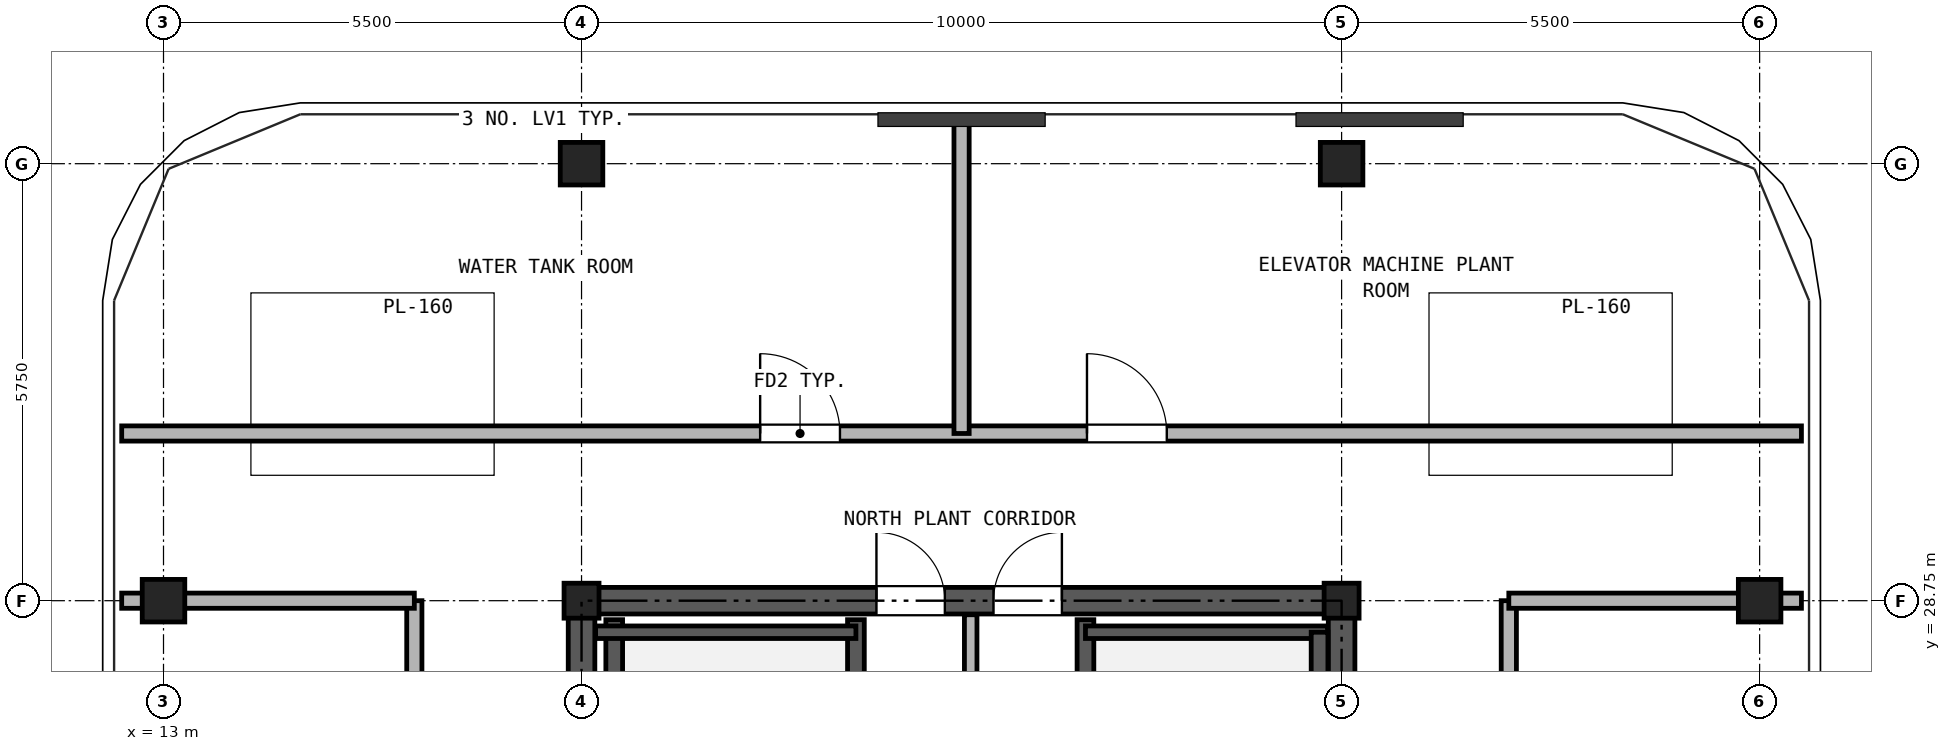
"""IFC4 building model, lengths in metres.
Left out: names, types, materials, properties, quantities, classifications, styles, units other than length and angle.
Written with IfcOpenShell. Run it as: python <this file> out.ifc"""

import sys

from ifc_helpers import new_model, si_unit, direction, frame, frame_2d, origin, origin_2d, place, context, subcontext, project, spatial, rectangle, hollow_rectangle, extrude, source, transform, mapped, element, fill, save


model = new_model("IFC4")
c1 = context("Model", 3, precision=1e-05, world=origin(), true_north=direction((0.0, 1.0)))
c2 = subcontext(c1, "Body", "Model", "MODEL_VIEW")
j1 = project(units=[si_unit("LENGTHUNIT", "METRE"), si_unit("PLANEANGLEUNIT", "RADIAN")], contexts=[c1])
p1 = place(None, origin())
s1 = spatial("IfcSite", under=j1, at=p1, CompositionType="ELEMENT")
p2 = place(p1, origin())
s2 = spatial("IfcBuilding", under=s1, at=p2, CompositionType="ELEMENT")
p3 = place(p2, frame((0.0, 0.0, 289.3)))
s3 = spatial("IfcBuildingStorey", under=s2, at=p3, CompositionType="ELEMENT", Elevation=289.3)
m1 = source(origin(), c2, "Body", "SweptSolid", [
    extrude(hollow_rectangle(XDim=0.56, YDim=0.56, WallThickness=0.03, at=origin_2d()), origin(), (0.0, 0.0, 1.0), 3.38),
])
for number, where, z_axis, x_axis in (
    (1, (18.5, 34.5, 0.0), (0.0, 0.0, 1.0), (1.0, 0.0, 0.0)),
    (2, (28.5, 34.5, 0.0), (0.0, 0.0, 1.0), (1.0, 0.0, 0.0)),
    (3, (13.0, 28.75, 0.0), (0.0, 0.0, 1.0), (1.0, 0.0, 0.0)),
    (4, (34.0, 28.75, 0.0), (0.0, 0.0, 1.0), (1.0, 0.0, 0.0)),
):
    element("IfcColumn", number, at=place(p3, frame(where, z_axis=z_axis, x_axis=x_axis)), inside=s3, PredefinedType="COLUMN", context=c2, shape_type="MappedRepresentation", body=[
        mapped(m1, transform((0.0, 0.0, 0.0), x_axis=(1.0, 0.0, 0.0), y_axis=(0.0, 1.0, 0.0), z_axis=(0.0, 0.0, 1.0), scale=1.0)),
    ])
m2 = source(origin(), c2, "Body", "SweptSolid", [
    extrude(hollow_rectangle(XDim=0.46, YDim=0.46, WallThickness=0.025, at=origin_2d()), origin(), (0.0, 0.0, 1.0), 3.38),
])
for number, where, z_axis, x_axis in (
    (5, (18.5, 28.75, 0.0), (0.0, 0.0, 1.0), (1.0, 0.0, 0.0)),
    (6, (28.5, 28.75, 0.0), (0.0, 0.0, 1.0), (1.0, 0.0, 0.0)),
):
    element("IfcColumn", number, at=place(p3, frame(where, z_axis=z_axis, x_axis=x_axis)), inside=s3, PredefinedType="COLUMN", context=c2, shape_type="MappedRepresentation", body=[
        mapped(m2, transform((0.0, 0.0, 0.0), x_axis=(1.0, 0.0, 0.0), y_axis=(0.0, 1.0, 0.0), z_axis=(0.0, 0.0, 1.0), scale=1.0)),
    ])
p4 = place(p3, frame((18.325, 28.75, 0.0), z_axis=(0.0, 0.0, 1.0), x_axis=(1.0, 0.0, 0.0)))
e7 = element("IfcWall", 7, at=p4, inside=s3, PredefinedType="SHEAR", context=c2, shape_type="SweptSolid", body=[
    extrude(rectangle(XDim=10.35, YDim=0.35, at=frame_2d((5.175, 0.0))), origin(), (0.0, 0.0, 1.0), 3.38),
])
p5 = place(p4, frame((4.055, 0.0, 0.0)))
e8 = element("IfcOpeningElement", 8, at=p5, cuts=e7, PredefinedType="OPENING", context=c2, shape_type="SweptSolid", body=[
    extrude(rectangle(XDim=0.9, YDim=2.05, at=frame_2d((0.45, 1.025))), frame((0.0, 0.185, 0.0), z_axis=(0.0, -1.0, 0.0), x_axis=(1.0, 0.0, 0.0)), (0.0, 0.0, 1.0), 0.37),
])
p6 = place(p4, frame((5.595, 0.0, 0.0)))
e9 = element("IfcOpeningElement", 9, at=p6, cuts=e7, PredefinedType="OPENING", context=c2, shape_type="SweptSolid", body=[
    extrude(rectangle(XDim=0.9, YDim=2.05, at=frame_2d((0.45, 1.025))), frame((0.0, 0.185, 0.0), z_axis=(0.0, -1.0, 0.0), x_axis=(1.0, 0.0, 0.0)), (0.0, 0.0, 1.0), 0.37),
])
p7 = place(p3, frame((18.5, 11.675, 0.0), z_axis=(0.0, 0.0, 1.0), x_axis=(0.0, 1.0, 0.0)))
e10 = element("IfcWall", 10, at=p7, inside=s3, PredefinedType="SHEAR", context=c2, shape_type="SweptSolid", body=[
    extrude(rectangle(XDim=16.9, YDim=0.35, at=frame_2d((8.45, 0.0))), origin(), (0.0, 0.0, 1.0), 3.38),
])
p8 = place(p7, frame((7.475, 0.0, 0.0)))
e11 = element("IfcOpeningElement", 11, at=p8, cuts=e10, PredefinedType="OPENING", context=c2, shape_type="SweptSolid", body=[
    extrude(rectangle(XDim=1.15, YDim=2.2, at=frame_2d((0.575, 1.1))), frame((0.0, 0.185, 0.0), z_axis=(0.0, -1.0, 0.0), x_axis=(1.0, 0.0, 0.0)), (0.0, 0.0, 1.0), 0.37),
])
p9 = place(p3, frame((28.5, 11.675, 0.0), z_axis=(0.0, 0.0, 1.0), x_axis=(0.0, 1.0, 0.0)))
e12 = element("IfcWall", 12, at=p9, inside=s3, PredefinedType="SHEAR", context=c2, shape_type="SweptSolid", body=[
    extrude(rectangle(XDim=16.9, YDim=0.35, at=frame_2d((8.45, 0.0))), origin(), (0.0, 0.0, 1.0), 3.38),
])
p10 = place(p9, frame((7.475, 0.0, 0.0)))
e13 = element("IfcOpeningElement", 13, at=p10, cuts=e12, PredefinedType="OPENING", context=c2, shape_type="SweptSolid", body=[
    extrude(rectangle(XDim=1.15, YDim=2.2, at=frame_2d((0.575, 1.1))), frame((0.0, 0.185, 0.0), z_axis=(0.0, -1.0, 0.0), x_axis=(1.0, 0.0, 0.0)), (0.0, 0.0, 1.0), 0.37),
])
for number, where, z_axis, x_axis in (
    (14, (18.93, 21.39, 0.0), (0.0, 0.0, 1.0), (0.0, 1.0, 0.0)),
    (15, (22.11, 21.39, 0.0), (0.0, 0.0, 1.0), (0.0, 1.0, 0.0)),
    (16, (25.13, 21.39, 0.0), (0.0, 0.0, 1.0), (0.0, 1.0, 0.0)),
):
    element("IfcWall", number, at=place(p3, frame(where, z_axis=z_axis, x_axis=x_axis)), inside=s3, PredefinedType="SOLIDWALL", context=c2, shape_type="SweptSolid", body=[
        extrude(rectangle(XDim=7.11, YDim=0.22, at=frame_2d((3.555, 0.0))), origin(), (0.0, 0.0, 1.0), 3.38),
    ])
p11 = place(p3, frame((18.685, 28.335, 0.0), z_axis=(0.0, 0.0, 1.0), x_axis=(1.0, 0.0, 0.0)))
e17 = element("IfcWall", 17, at=p11, inside=s3, PredefinedType="PARTITIONING", context=c2, shape_type="SweptSolid", body=[
    extrude(rectangle(XDim=3.425, YDim=0.165, at=frame_2d((1.712, 0.0))), origin(), (0.0, 0.0, 1.0), 3.38),
])
p12 = place(p3, frame((25.13, 28.335, 0.0), z_axis=(0.0, 0.0, 1.0), x_axis=(1.0, 0.0, 0.0)))
e18 = element("IfcWall", 18, at=p12, inside=s3, PredefinedType="PARTITIONING", context=c2, shape_type="SweptSolid", body=[
    extrude(rectangle(XDim=3.185, YDim=0.165, at=frame_2d((1.593, 0.0))), origin(), (0.0, 0.0, 1.0), 3.38),
])
p13 = place(p3, frame((28.21, 21.39, 0.0), z_axis=(0.0, 0.0, 1.0), x_axis=(0.0, 1.0, 0.0)))
e19 = element("IfcWall", 19, at=p13, inside=s3, PredefinedType="SOLIDWALL", context=c2, shape_type="SweptSolid", body=[
    extrude(rectangle(XDim=6.945, YDim=0.22, at=frame_2d((3.473, 0.0))), origin(), (0.0, 0.0, 1.0), 3.38),
])
p14 = place(p3, frame((23.62, 24.4, 0.0), z_axis=(0.0, 0.0, 1.0), x_axis=(0.0, 1.0, 0.0)))
e20 = element("IfcWall", 20, at=p14, inside=s3, PredefinedType="PARTITIONING", context=c2, shape_type="SweptSolid", body=[
    extrude(rectangle(XDim=4.165, YDim=0.165, at=frame_2d((2.083, 0.0))), origin(), (0.0, 0.0, 1.0), 3.38),
])
p15 = place(p3, frame((12.45, 30.95, 0.0), z_axis=(0.0, 0.0, 1.0), x_axis=(1.0, 0.0, 0.0)))
e21 = element("IfcWall", 21, at=p15, inside=s3, PredefinedType="PARTITIONING", context=c2, shape_type="SweptSolid", body=[
    extrude(rectangle(XDim=22.1, YDim=0.2, at=frame_2d((11.05, 0.0))), origin(), (0.0, 0.0, 1.0), 3.38),
])
p16 = place(p15, frame((8.4, 0.0, 0.0)))
e22 = element("IfcOpeningElement", 22, at=p16, cuts=e21, PredefinedType="OPENING", context=c2, shape_type="SweptSolid", body=[
    extrude(rectangle(XDim=1.05, YDim=2.15, at=frame_2d((0.525, 1.075))), frame((0.0, 0.11, 0.0), z_axis=(0.0, -1.0, 0.0), x_axis=(1.0, 0.0, 0.0)), (0.0, 0.0, 1.0), 0.22),
])
p17 = place(p15, frame((12.7, 0.0, 0.0)))
e23 = element("IfcOpeningElement", 23, at=p17, cuts=e21, PredefinedType="OPENING", context=c2, shape_type="SweptSolid", body=[
    extrude(rectangle(XDim=1.05, YDim=2.15, at=frame_2d((0.525, 1.075))), frame((0.0, 0.11, 0.0), z_axis=(0.0, -1.0, 0.0), x_axis=(1.0, 0.0, 0.0)), (0.0, 0.0, 1.0), 0.22),
])
p18 = place(p3, frame((16.3, 8.9, 0.0), z_axis=(0.0, 0.0, 1.0), x_axis=(0.0, 1.0, 0.0)))
e24 = element("IfcWall", 24, at=p18, inside=s3, PredefinedType="PARTITIONING", context=c2, shape_type="SweptSolid", body=[
    extrude(rectangle(XDim=19.85, YDim=0.2, at=frame_2d((9.925, 0.0))), origin(), (0.0, 0.0, 1.0), 3.38),
])
p19 = place(p18, frame((4.55, 0.0, 0.0)))
e25 = element("IfcOpeningElement", 25, at=p19, cuts=e24, PredefinedType="OPENING", context=c2, shape_type="SweptSolid", body=[
    extrude(rectangle(XDim=1.05, YDim=2.15, at=frame_2d((0.525, 1.075))), frame((0.0, 0.11, 0.0), z_axis=(0.0, -1.0, 0.0), x_axis=(1.0, 0.0, 0.0)), (0.0, 0.0, 1.0), 0.22),
])
p20 = place(p18, frame((14.475, 0.0, 0.0)))
e26 = element("IfcOpeningElement", 26, at=p20, cuts=e24, PredefinedType="OPENING", context=c2, shape_type="SweptSolid", body=[
    extrude(rectangle(XDim=1.05, YDim=2.15, at=frame_2d((0.525, 1.075))), frame((0.0, 0.11, 0.0), z_axis=(0.0, -1.0, 0.0), x_axis=(1.0, 0.0, 0.0)), (0.0, 0.0, 1.0), 0.22),
])
p21 = place(p3, frame((30.7, 8.9, 0.0), z_axis=(0.0, 0.0, 1.0), x_axis=(0.0, 1.0, 0.0)))
e27 = element("IfcWall", 27, at=p21, inside=s3, PredefinedType="PARTITIONING", context=c2, shape_type="SweptSolid", body=[
    extrude(rectangle(XDim=19.85, YDim=0.2, at=frame_2d((9.925, 0.0))), origin(), (0.0, 0.0, 1.0), 3.38),
])
p22 = place(p21, frame((9.425, 0.0, 0.0)))
e28 = element("IfcOpeningElement", 28, at=p22, cuts=e27, PredefinedType="OPENING", context=c2, shape_type="SweptSolid", body=[
    extrude(rectangle(XDim=1.05, YDim=2.15, at=frame_2d((0.525, 1.075))), frame((0.0, 0.11, 0.0), z_axis=(0.0, -1.0, 0.0), x_axis=(1.0, 0.0, 0.0)), (0.0, 0.0, 1.0), 0.22),
])
for number, where, z_axis, x_axis in (
    (29, (12.45, 28.75, 0.0), (0.0, 0.0, 1.0), (1.0, 0.0, 0.0)),
    (30, (30.7, 28.75, 0.0), (0.0, 0.0, 1.0), (1.0, 0.0, 0.0)),
):
    element("IfcWall", number, at=place(p3, frame(where, z_axis=z_axis, x_axis=x_axis)), inside=s3, PredefinedType="PARTITIONING", context=c2, shape_type="SweptSolid", body=[
        extrude(rectangle(XDim=3.85, YDim=0.2, at=frame_2d((1.925, 0.0))), origin(), (0.0, 0.0, 1.0), 2.905),
    ])
p23 = place(p3, frame((23.5, 30.95, 0.0), z_axis=(0.0, 0.0, 1.0), x_axis=(0.0, 1.0, 0.0)))
e31 = element("IfcWall", 31, at=p23, inside=s3, PredefinedType="PARTITIONING", context=c2, shape_type="SweptSolid", body=[
    extrude(rectangle(XDim=4.1, YDim=0.2, at=frame_2d((2.05, 0.0))), origin(), (0.0, 0.0, 1.0), 3.38),
])
p24 = place(p5, origin())
e32 = element("IfcDoor", 32, at=p24, inside=s3, OperationType="SINGLE_SWING_LEFT", PredefinedType="DOOR", context=c2, shape_type="SweptSolid", body=[
    extrude(rectangle(XDim=0.9, YDim=2.05, at=frame_2d((0.45, 1.025))), frame((0.0, 0.025, 0.0), z_axis=(0.0, -1.0, 0.0), x_axis=(1.0, 0.0, 0.0)), (0.0, 0.0, 1.0), 0.05),
])
fill(e8, e32)
p25 = place(p6, origin())
e33 = element("IfcDoor", 33, at=p25, inside=s3, OperationType="SINGLE_SWING_RIGHT", PredefinedType="DOOR", context=c2, shape_type="SweptSolid", body=[
    extrude(rectangle(XDim=0.9, YDim=2.05, at=frame_2d((0.45, 1.025))), frame((0.0, 0.025, 0.0), z_axis=(0.0, -1.0, 0.0), x_axis=(1.0, 0.0, 0.0)), (0.0, 0.0, 1.0), 0.05),
])
fill(e9, e33)
p26 = place(p16, origin())
e34 = element("IfcDoor", 34, at=p26, inside=s3, OperationType="SINGLE_SWING_LEFT", PredefinedType="DOOR", context=c2, shape_type="SweptSolid", body=[
    extrude(rectangle(XDim=1.05, YDim=2.15, at=frame_2d((0.525, 1.075))), frame((0.0, 0.025, 0.0), z_axis=(0.0, -1.0, 0.0), x_axis=(1.0, 0.0, 0.0)), (0.0, 0.0, 1.0), 0.05),
])
fill(e22, e34)
p27 = place(p17, origin())
e35 = element("IfcDoor", 35, at=p27, inside=s3, OperationType="SINGLE_SWING_LEFT", PredefinedType="DOOR", context=c2, shape_type="SweptSolid", body=[
    extrude(rectangle(XDim=1.05, YDim=2.15, at=frame_2d((0.525, 1.075))), frame((0.0, 0.025, 0.0), z_axis=(0.0, -1.0, 0.0), x_axis=(1.0, 0.0, 0.0)), (0.0, 0.0, 1.0), 0.05),
])
fill(e23, e35)
save(model, sys.argv[1])
